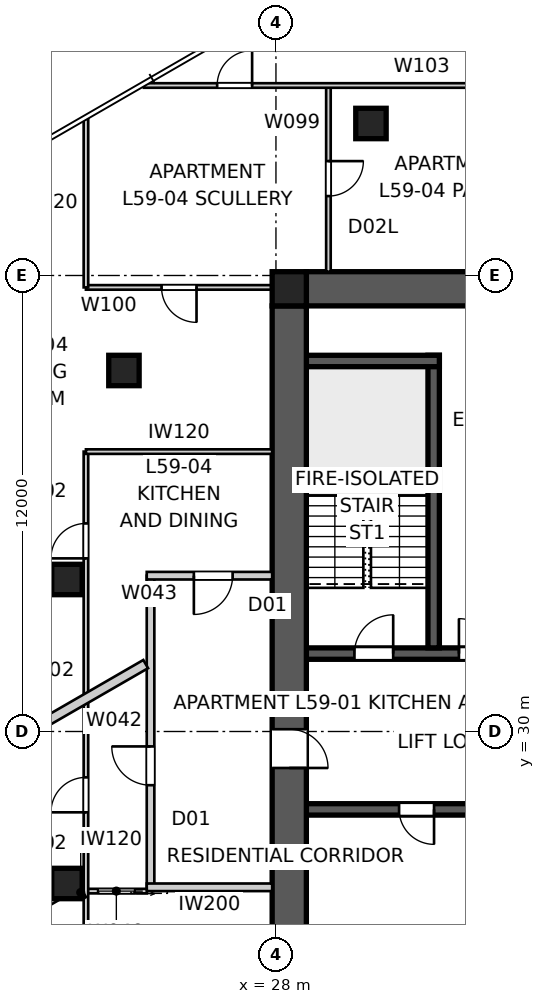
"""IFC4 building model, lengths in metres.
Left out: names, types, materials, properties, quantities, classifications, styles, units other than length and angle.
Written with IfcOpenShell. Run it as: python <this file> out.ifc"""

import sys

from ifc_helpers import new_model, si_unit, direction, frame, frame_2d, origin, origin_2d, place, context, subcontext, project, spatial, polyline, rectangle, outline, extrude, element, fill, save


model = new_model("IFC4")
c1 = context("Model", 3, precision=1e-05, world=origin(), true_north=direction((0.0, 1.0)))
c2 = subcontext(c1, "Body", "Model", "MODEL_VIEW")
j1 = project(units=[si_unit("LENGTHUNIT", "METRE"), si_unit("PLANEANGLEUNIT", "RADIAN")], contexts=[c1])
p1 = place(None, origin())
s1 = spatial("IfcSite", under=j1, at=p1, CompositionType="ELEMENT")
p2 = place(p1, origin())
s2 = spatial("IfcBuilding", under=s1, at=p2, CompositionType="ELEMENT")
p3 = place(p2, frame((0.0, 0.0, 215.0)))
s3 = spatial("IfcBuildingStorey", under=s2, at=p3, CompositionType="ELEMENT", Elevation=215.0)
p4 = place(p3, frame((28.8, 41.65, 0.0), z_axis=(0.0, 0.0, 1.0), x_axis=(1.0, 0.0, 0.0)))
e1 = element("IfcWall", 1, at=p4, inside=s3, PredefinedType="SHEAR", context=c2, shape_type="SweptSolid", body=[
    extrude(outline(polyline([(0.0, -0.45), (22.4, -0.45), (22.4, -0.025), (22.85, -0.025), (22.85, 0.025), (22.4, 0.025), (22.4, 0.45), (0.0, 0.45), (0.0, 0.025), (-0.45, 0.025), (-0.45, -0.025), (0.0, -0.025), (0.0, -0.45)])), origin(), (0.0, 0.0, 1.0), 3.4),
])
p5 = place(p3, frame((28.35, 41.2, 0.0), z_axis=(0.0, 0.0, 1.0), x_axis=(0.0, -1.0, 0.0)))
e2 = element("IfcWall", 2, at=p5, inside=s3, PredefinedType="SHEAR", context=c2, shape_type="SweptSolid", body=[
    extrude(outline(polyline([(0.0, -0.45), (22.4, -0.45), (22.4, -0.025), (22.85, -0.025), (22.85, 0.025), (22.4, 0.025), (22.4, 0.45), (0.0, 0.45), (0.0, 0.025), (-0.45, 0.025), (-0.45, -0.025), (0.0, -0.025), (0.0, -0.45)])), origin(), (0.0, 0.0, 1.0), 3.4),
])
p6 = place(p5, frame((11.14, 0.0, 0.0)))
e3 = element("IfcOpeningElement", 3, at=p6, cuts=e2, PredefinedType="OPENING", context=c2, shape_type="SweptSolid", body=[
    extrude(rectangle(XDim=1.02, YDim=2.4, at=frame_2d((0.51, 1.2))), frame((0.0, 0.46, 0.0), z_axis=(0.0, -1.0, 0.0), x_axis=(1.0, 0.0, 0.0)), (0.0, 0.0, 1.0), 0.92),
])
p7 = place(p3, frame((28.8, 32.05, 0.0), z_axis=(0.0, 0.0, 1.0), x_axis=(1.0, 0.0, 0.0)))
e4 = element("IfcWall", 4, at=p7, inside=s3, PredefinedType="SHEAR", context=c2, shape_type="SweptSolid", body=[
    extrude(rectangle(XDim=22.4, YDim=0.3, at=frame_2d((11.2, 0.0))), origin(), (0.0, 0.0, 1.0), 3.4),
])
p8 = place(p7, frame((19.04, 0.0, 0.0)))
e5 = element("IfcOpeningElement", 5, at=p8, cuts=e4, PredefinedType="OPENING", context=c2, shape_type="SweptSolid", body=[
    extrude(rectangle(XDim=0.92, YDim=2.1, at=frame_2d((0.46, 1.05))), frame((0.0, 0.16, 0.0), z_axis=(0.0, -1.0, 0.0), x_axis=(1.0, 0.0, 0.0)), (0.0, 0.0, 1.0), 0.32),
])
p9 = place(p7, frame((1.265, 0.0, 0.0)))
e6 = element("IfcOpeningElement", 6, at=p9, cuts=e4, PredefinedType="OPENING", context=c2, shape_type="SweptSolid", body=[
    extrude(rectangle(XDim=1.02, YDim=2.1, at=frame_2d((0.51, 1.05))), frame((0.0, 0.16, 0.0), z_axis=(0.0, -1.0, 0.0), x_axis=(1.0, 0.0, 0.0)), (0.0, 0.0, 1.0), 0.32),
])
p10 = place(p7, frame((4.015, 0.0, 0.0)))
e7 = element("IfcOpeningElement", 7, at=p10, cuts=e4, PredefinedType="OPENING", context=c2, shape_type="SweptSolid", body=[
    extrude(rectangle(XDim=0.92, YDim=2.1, at=frame_2d((0.46, 1.05))), frame((0.0, 0.16, 0.0), z_axis=(0.0, -1.0, 0.0), x_axis=(1.0, 0.0, 0.0)), (0.0, 0.0, 1.0), 0.32),
])
p11 = place(p7, frame((7.015, 0.0, 0.0)))
e8 = element("IfcOpeningElement", 8, at=p11, cuts=e4, PredefinedType="OPENING", context=c2, shape_type="SweptSolid", body=[
    extrude(rectangle(XDim=0.92, YDim=2.1, at=frame_2d((0.46, 1.05))), frame((0.0, 0.16, 0.0), z_axis=(0.0, -1.0, 0.0), x_axis=(1.0, 0.0, 0.0)), (0.0, 0.0, 1.0), 0.32),
])
p12 = place(p7, frame((9.34, 0.0, 0.0)))
e9 = element("IfcOpeningElement", 9, at=p12, cuts=e4, PredefinedType="OPENING", context=c2, shape_type="SweptSolid", body=[
    extrude(rectangle(XDim=0.92, YDim=2.1, at=frame_2d((0.46, 1.05))), frame((0.0, 0.16, 0.0), z_axis=(0.0, -1.0, 0.0), x_axis=(1.0, 0.0, 0.0)), (0.0, 0.0, 1.0), 0.32),
])
p13 = place(p7, frame((12.05, 0.0, 0.0)))
e10 = element("IfcOpeningElement", 10, at=p13, cuts=e4, PredefinedType="OPENING", context=c2, shape_type="SweptSolid", body=[
    extrude(rectangle(XDim=1.1, YDim=2.1, at=frame_2d((0.55, 1.05))), frame((0.0, 0.16, 0.0), z_axis=(0.0, -1.0, 0.0), x_axis=(1.0, 0.0, 0.0)), (0.0, 0.0, 1.0), 0.32),
])
p14 = place(p7, frame((14.85, 0.0, 0.0)))
e11 = element("IfcOpeningElement", 11, at=p14, cuts=e4, PredefinedType="OPENING", context=c2, shape_type="SweptSolid", body=[
    extrude(rectangle(XDim=1.1, YDim=2.1, at=frame_2d((0.55, 1.05))), frame((0.0, 0.16, 0.0), z_axis=(0.0, -1.0, 0.0), x_axis=(1.0, 0.0, 0.0)), (0.0, 0.0, 1.0), 0.32),
])
p15 = place(p3, frame((51.2, 27.95, 0.0), z_axis=(0.0, 0.0, 1.0), x_axis=(-1.0, 0.0, 0.0)))
e12 = element("IfcWall", 12, at=p15, inside=s3, PredefinedType="SHEAR", context=c2, shape_type="SweptSolid", body=[
    extrude(rectangle(XDim=22.4, YDim=0.3, at=frame_2d((11.2, 0.0))), origin(), (0.0, 0.0, 1.0), 3.4),
])
p16 = place(p15, frame((19.04, 0.0, 0.0)))
e13 = element("IfcOpeningElement", 13, at=p16, cuts=e12, PredefinedType="OPENING", context=c2, shape_type="SweptSolid", body=[
    extrude(rectangle(XDim=0.92, YDim=2.1, at=frame_2d((0.46, 1.05))), frame((0.0, 0.16, 0.0), z_axis=(0.0, -1.0, 0.0), x_axis=(1.0, 0.0, 0.0)), (0.0, 0.0, 1.0), 0.32),
])
p17 = place(p15, frame((1.265, 0.0, 0.0)))
e14 = element("IfcOpeningElement", 14, at=p17, cuts=e12, PredefinedType="OPENING", context=c2, shape_type="SweptSolid", body=[
    extrude(rectangle(XDim=1.02, YDim=2.1, at=frame_2d((0.51, 1.05))), frame((0.0, 0.16, 0.0), z_axis=(0.0, -1.0, 0.0), x_axis=(1.0, 0.0, 0.0)), (0.0, 0.0, 1.0), 0.32),
])
p18 = place(p15, frame((4.015, 0.0, 0.0)))
e15 = element("IfcOpeningElement", 15, at=p18, cuts=e12, PredefinedType="OPENING", context=c2, shape_type="SweptSolid", body=[
    extrude(rectangle(XDim=0.92, YDim=2.1, at=frame_2d((0.46, 1.05))), frame((0.0, 0.16, 0.0), z_axis=(0.0, -1.0, 0.0), x_axis=(1.0, 0.0, 0.0)), (0.0, 0.0, 1.0), 0.32),
])
p19 = place(p15, frame((9.79, 0.0, 0.0)))
e16 = element("IfcOpeningElement", 16, at=p19, cuts=e12, PredefinedType="OPENING", context=c2, shape_type="SweptSolid", body=[
    extrude(rectangle(XDim=0.92, YDim=2.1, at=frame_2d((0.46, 1.05))), frame((0.0, 0.16, 0.0), z_axis=(0.0, -1.0, 0.0), x_axis=(1.0, 0.0, 0.0)), (0.0, 0.0, 1.0), 0.32),
])
p20 = place(p15, frame((6.115, 0.0, 0.0)))
e17 = element("IfcOpeningElement", 17, at=p20, cuts=e12, PredefinedType="OPENING", context=c2, shape_type="SweptSolid", body=[
    extrude(rectangle(XDim=0.92, YDim=2.1, at=frame_2d((0.46, 1.05))), frame((0.0, 0.16, 0.0), z_axis=(0.0, -1.0, 0.0), x_axis=(1.0, 0.0, 0.0)), (0.0, 0.0, 1.0), 0.32),
])
p21 = place(p15, frame((12.05, 0.0, 0.0)))
e18 = element("IfcOpeningElement", 18, at=p21, cuts=e12, PredefinedType="OPENING", context=c2, shape_type="SweptSolid", body=[
    extrude(rectangle(XDim=1.1, YDim=2.1, at=frame_2d((0.55, 1.05))), frame((0.0, 0.16, 0.0), z_axis=(0.0, -1.0, 0.0), x_axis=(1.0, 0.0, 0.0)), (0.0, 0.0, 1.0), 0.32),
])
p22 = place(p15, frame((14.85, 0.0, 0.0)))
e19 = element("IfcOpeningElement", 19, at=p22, cuts=e12, PredefinedType="OPENING", context=c2, shape_type="SweptSolid", body=[
    extrude(rectangle(XDim=1.1, YDim=2.1, at=frame_2d((0.55, 1.05))), frame((0.0, 0.16, 0.0), z_axis=(0.0, -1.0, 0.0), x_axis=(1.0, 0.0, 0.0)), (0.0, 0.0, 1.0), 0.32),
])
p23 = place(p3, frame((32.15, 32.2, 0.0), z_axis=(0.0, 0.0, 1.0), x_axis=(0.0, 1.0, 0.0)))
e20 = element("IfcWall", 20, at=p23, inside=s3, PredefinedType="SHEAR", context=c2, shape_type="SweptSolid", body=[
    extrude(rectangle(XDim=7.7, YDim=0.3, at=frame_2d((3.85, 0.0))), origin(), (0.0, 0.0, 1.0), 3.4),
])
p24 = place(p3, frame((28.8, 39.75, 0.0), z_axis=(0.0, 0.0, 1.0), x_axis=(1.0, 0.0, 0.0)))
e21 = element("IfcWall", 21, at=p24, inside=s3, PredefinedType="SHEAR", context=c2, shape_type="SweptSolid", body=[
    extrude(rectangle(XDim=3.5, YDim=0.3, at=frame_2d((1.75, 0.0))), origin(), (0.0, 0.0, 1.0), 3.4),
])
p25 = place(p3, frame((28.35, 41.65, 0.0), z_axis=(0.0, 0.0, 1.0), x_axis=(1.0, 0.0, 0.0)))
e22 = element("IfcColumn", 22, at=p25, inside=s3, PredefinedType="COLUMN", context=c2, shape_type="SweptSolid", body=[
    extrude(rectangle(XDim=0.9, YDim=0.9, at=origin_2d()), origin(), (0.0, 0.0, 1.0), 3.4),
])
for number, where, z_axis, x_axis in (
    (23, (30.5, 46.0, 0.0), (0.0, 0.0, 1.0), (1.0, 0.0, 0.0)),
    (24, (24.0, 39.5, 0.0), (0.0, 0.0, 1.0), (1.0, 0.0, 0.0)),
    (25, (22.5, 34.0, 0.0), (0.0, 0.0, 1.0), (1.0, 0.0, 0.0)),
    (26, (22.5, 26.0, 0.0), (0.0, 0.0, 1.0), (1.0, 0.0, 0.0)),
):
    element("IfcColumn", number, at=place(p3, frame(where, z_axis=z_axis, x_axis=x_axis)), inside=s3, PredefinedType="COLUMN", context=c2, shape_type="SweptSolid", body=[
        extrude(rectangle(XDim=0.8, YDim=0.8, at=origin_2d()), origin(), (0.0, 0.0, 1.0), 3.4),
    ])
p26 = place(p3, frame((24.7, 25.9, 0.0), z_axis=(0.0, 0.0, 1.0), x_axis=(0.0, 1.0, 0.0)))
e27 = element("IfcWall", 27, at=p26, inside=s3, PredefinedType="PARTITIONING", context=c2, shape_type="SweptSolid", body=[
    extrude(rectangle(XDim=8.2, YDim=0.2, at=frame_2d((4.1, 0.0))), origin(), (0.0, 0.0, 1.0), 3.25),
])
p27 = place(p26, frame((2.687, 0.0, 0.0)))
e28 = element("IfcOpeningElement", 28, at=p27, cuts=e27, PredefinedType="OPENING", context=c2, shape_type="SweptSolid", body=[
    extrude(rectangle(XDim=1.02, YDim=2.34, at=frame_2d((0.51, 1.17))), frame((0.0, 0.11, 0.0), z_axis=(0.0, -1.0, 0.0), x_axis=(1.0, 0.0, 0.0)), (0.0, 0.0, 1.0), 0.22),
])
p28 = place(p3, frame((27.9, 34.1, 0.0), z_axis=(0.0, 0.0, 1.0), x_axis=(-1.0, 0.0, 0.0)))
e29 = element("IfcWall", 29, at=p28, inside=s3, PredefinedType="PARTITIONING", context=c2, shape_type="SweptSolid", body=[
    extrude(rectangle(XDim=3.3, YDim=0.2, at=frame_2d((1.65, 0.0))), origin(), (0.0, 0.0, 1.0), 3.25),
])
p29 = place(p28, frame((1.04, 0.0, 0.0)))
e30 = element("IfcOpeningElement", 30, at=p29, cuts=e29, PredefinedType="OPENING", context=c2, shape_type="SweptSolid", body=[
    extrude(rectangle(XDim=1.02, YDim=2.34, at=frame_2d((0.51, 1.17))), frame((0.0, 0.11, 0.0), z_axis=(0.0, -1.0, 0.0), x_axis=(1.0, 0.0, 0.0)), (0.0, 0.0, 1.0), 0.22),
])
p30 = place(p3, frame((27.9, 25.9, 0.0), z_axis=(0.0, 0.0, 1.0), x_axis=(-1.0, 0.0, 0.0)))
e31 = element("IfcWall", 31, at=p30, inside=s3, PredefinedType="PARTITIONING", context=c2, shape_type="SweptSolid", body=[
    extrude(rectangle(XDim=3.3, YDim=0.2, at=frame_2d((1.65, 0.0))), origin(), (0.0, 0.0, 1.0), 3.25),
])
p31 = place(p3, frame((15.889, 26.761, 0.0), z_axis=(0.0, 0.0, 1.0), x_axis=(0.866024190901, 0.50000210077, 0.0)))
e32 = element("IfcWall", 32, at=p31, inside=s3, PredefinedType="PARTITIONING", context=c2, shape_type="SweptSolid", body=[
    extrude(rectangle(XDim=10.026, YDim=0.25, at=frame_2d((5.013, 0.0))), origin(), (0.0, 0.0, 1.0), 3.25),
])
p32 = place(p3, frame((24.6, 25.8, 0.0), z_axis=(0.0, 0.0, 1.0), x_axis=(-1.0, 0.0, 0.0)))
e33 = element("IfcWall", 33, at=p32, inside=s3, PredefinedType="PARTITIONING", context=c2, shape_type="SweptSolid", body=[
    extrude(rectangle(XDim=1.6, YDim=0.12, at=frame_2d((0.8, 0.0))), origin(), (0.0, 0.0, 1.0), 3.25),
])
p33 = place(p32, frame((0.32, 0.0, 0.0)))
e34 = element("IfcOpeningElement", 34, at=p33, cuts=e33, PredefinedType="OPENING", context=c2, shape_type="SweptSolid", body=[
    extrude(rectangle(XDim=0.96, YDim=2.1, at=frame_2d((0.48, 1.05))), frame((0.0, 0.07, 0.0), z_axis=(0.0, -1.0, 0.0), x_axis=(1.0, 0.0, 0.0)), (0.0, 0.0, 1.0), 0.14),
])
p34 = place(p3, frame((23.0, 20.185, 0.0), z_axis=(0.0, 0.0, 1.0), x_axis=(0.0, 1.0, 0.0)))
e35 = element("IfcWall", 35, at=p34, inside=s3, PredefinedType="PARTITIONING", context=c2, shape_type="SweptSolid", body=[
    extrude(rectangle(XDim=17.18, YDim=0.12, at=frame_2d((8.59, 0.0))), origin(), (0.0, 0.0, 1.0), 2.55),
])
p35 = place(p34, frame((7.688, 0.0, 0.0)))
e36 = element("IfcOpeningElement", 36, at=p35, cuts=e35, PredefinedType="OPENING", context=c2, shape_type="SweptSolid", body=[
    extrude(rectangle(XDim=0.92, YDim=2.34, at=frame_2d((0.46, 1.17))), frame((0.0, 0.07, 0.0), z_axis=(0.0, -1.0, 0.0), x_axis=(1.0, 0.0, 0.0)), (0.0, 0.0, 1.0), 0.14),
])
p36 = place(p34, frame((14.371, 0.0, 0.0)))
e37 = element("IfcOpeningElement", 37, at=p36, cuts=e35, PredefinedType="OPENING", context=c2, shape_type="SweptSolid", body=[
    extrude(rectangle(XDim=0.92, YDim=2.34, at=frame_2d((0.46, 1.17))), frame((0.0, 0.07, 0.0), z_axis=(0.0, -1.0, 0.0), x_axis=(1.0, 0.0, 0.0)), (0.0, 0.0, 1.0), 0.14),
])
p37 = place(p3, frame((22.95, 25.612, 0.0), z_axis=(0.0, 0.0, 1.0), x_axis=(-0.49996389635, 0.866046247233, 0.0)))
e38 = element("IfcWall", 38, at=p37, inside=s3, PredefinedType="PARTITIONING", context=c2, shape_type="SweptSolid", body=[
    extrude(rectangle(XDim=0.35, YDim=0.12, at=frame_2d((0.175, 0.0))), origin(), (0.0, 0.0, 1.0), 3.25),
])
p38 = place(p3, frame((22.775, 25.915, 0.0), z_axis=(0.0, 0.0, 1.0), x_axis=(-0.866019274569, -0.500010615962, 0.0)))
e39 = element("IfcWall", 39, at=p38, inside=s3, PredefinedType="PARTITIONING", context=c2, shape_type="SweptSolid", body=[
    extrude(rectangle(XDim=5.5, YDim=0.12, at=frame_2d((2.75, 0.0))), origin(), (0.0, 0.0, 1.0), 3.25),
])
p39 = place(p38, frame((2.31, 0.0, 0.0)))
e40 = element("IfcOpeningElement", 40, at=p39, cuts=e39, PredefinedType="OPENING", context=c2, shape_type="SweptSolid", body=[
    extrude(rectangle(XDim=0.92, YDim=2.34, at=frame_2d((0.46, 1.17))), frame((0.0, 0.07, 0.0), z_axis=(0.0, -1.0, 0.0), x_axis=(1.0, 0.0, 0.0)), (0.0, 0.0, 1.0), 0.14),
])
p40 = place(p3, frame((23.0, 37.365, 0.0), z_axis=(0.0, 0.0, 1.0), x_axis=(1.0, 0.0, 0.0)))
e41 = element("IfcWall", 41, at=p40, inside=s3, PredefinedType="PARTITIONING", context=c2, shape_type="SweptSolid", body=[
    extrude(rectangle(XDim=4.9, YDim=0.12, at=frame_2d((2.45, 0.0))), origin(), (0.0, 0.0, 1.0), 3.25),
])
p41 = place(p3, frame((29.381, 47.0, 0.0), z_axis=(0.0, 0.0, 1.0), x_axis=(0.0, -1.0, 0.0)))
e42 = element("IfcWall", 42, at=p41, inside=s3, PredefinedType="PARTITIONING", context=c2, shape_type="SweptSolid", body=[
    extrude(rectangle(XDim=4.9, YDim=0.12, at=frame_2d((2.45, 0.0))), origin(), (0.0, 0.0, 1.0), 3.25),
])
p42 = place(p41, frame((1.99, 0.0, 0.0)))
e43 = element("IfcOpeningElement", 43, at=p42, cuts=e42, PredefinedType="OPENING", context=c2, shape_type="SweptSolid", body=[
    extrude(rectangle(XDim=0.92, YDim=2.1, at=frame_2d((0.46, 1.05))), frame((0.0, 0.07, 0.0), z_axis=(0.0, -1.0, 0.0), x_axis=(1.0, 0.0, 0.0)), (0.0, 0.0, 1.0), 0.14),
])
p43 = place(p3, frame((27.9, 41.687, 0.0), z_axis=(0.0, 0.0, 1.0), x_axis=(-1.0, 0.0, 0.0)))
e44 = element("IfcWall", 44, at=p43, inside=s3, PredefinedType="PARTITIONING", context=c2, shape_type="SweptSolid", body=[
    extrude(rectangle(XDim=4.9, YDim=0.12, at=frame_2d((2.45, 0.0))), origin(), (0.0, 0.0, 1.0), 3.25),
])
p44 = place(p43, frame((1.99, 0.0, 0.0)))
e45 = element("IfcOpeningElement", 45, at=p44, cuts=e44, PredefinedType="OPENING", context=c2, shape_type="SweptSolid", body=[
    extrude(rectangle(XDim=0.92, YDim=2.1, at=frame_2d((0.46, 1.05))), frame((0.0, 0.07, 0.0), z_axis=(0.0, -1.0, 0.0), x_axis=(1.0, 0.0, 0.0)), (0.0, 0.0, 1.0), 0.14),
])
p45 = place(p3, frame((23.0, 41.687, 0.0), z_axis=(0.0, 0.0, 1.0), x_axis=(0.0, 1.0, 0.0)))
e46 = element("IfcWall", 46, at=p45, inside=s3, PredefinedType="PARTITIONING", context=c2, shape_type="SweptSolid", body=[
    extrude(rectangle(XDim=4.433, YDim=0.12, at=frame_2d((2.216, 0.0))), origin(), (0.0, 0.0, 1.0), 3.25),
])
p46 = place(p3, frame((24.525, 47.0, 0.0), z_axis=(0.0, 0.0, 1.0), x_axis=(1.0, 0.0, 0.0)))
e47 = element("IfcWall", 47, at=p46, inside=s3, PredefinedType="PARTITIONING", context=c2, shape_type="SweptSolid", body=[
    extrude(rectangle(XDim=22.087, YDim=0.12, at=frame_2d((11.044, 0.0))), origin(), (0.0, 0.0, 1.0), 2.55),
])
p47 = place(p46, frame((1.928, 0.0, 0.0)))
e48 = element("IfcOpeningElement", 48, at=p47, cuts=e47, PredefinedType="OPENING", context=c2, shape_type="SweptSolid", body=[
    extrude(rectangle(XDim=0.92, YDim=2.34, at=frame_2d((0.46, 1.17))), frame((0.0, 0.07, 0.0), z_axis=(0.0, -1.0, 0.0), x_axis=(1.0, 0.0, 0.0)), (0.0, 0.0, 1.0), 0.14),
])
p48 = place(p46, frame((17.73, 0.0, 0.0)))
e49 = element("IfcOpeningElement", 49, at=p48, cuts=e47, PredefinedType="OPENING", context=c2, shape_type="SweptSolid", body=[
    extrude(rectangle(XDim=0.96, YDim=2.1, at=frame_2d((0.48, 1.05))), frame((0.0, 0.07, 0.0), z_axis=(0.0, -1.0, 0.0), x_axis=(1.0, 0.0, 0.0)), (0.0, 0.0, 1.0), 0.14),
])
p49 = place(p3, frame((35.526, 47.0, 0.0), z_axis=(0.0, 0.0, 1.0), x_axis=(-0.500010615962, 0.866019274569, 0.0)))
e50 = element("IfcWall", 50, at=p49, inside=s3, PredefinedType="PARTITIONING", context=c2, shape_type="SweptSolid", body=[
    extrude(rectangle(XDim=5.5, YDim=0.12, at=frame_2d((2.75, 0.0))), origin(), (0.0, 0.0, 1.0), 3.25),
])
p50 = place(p49, frame((2.31, 0.0, 0.0)))
e51 = element("IfcOpeningElement", 51, at=p50, cuts=e50, PredefinedType="OPENING", context=c2, shape_type="SweptSolid", body=[
    extrude(rectangle(XDim=0.92, YDim=2.34, at=frame_2d((0.46, 1.17))), frame((0.0, 0.07, 0.0), z_axis=(0.0, -1.0, 0.0), x_axis=(1.0, 0.0, 0.0)), (0.0, 0.0, 1.0), 0.14),
])
p51 = place(p3, frame((27.9, 41.687, 0.0), z_axis=(0.0, 0.0, 1.0), x_axis=(0.999162409553, -0.040920402453, 0.0)))
e52 = element("IfcWall", 52, at=p51, inside=s3, PredefinedType="PARTITIONING", context=c2, shape_type="SweptSolid", body=[
    extrude(rectangle(XDim=0.901, YDim=0.12, at=frame_2d((0.45, 0.0))), origin(), (0.0, 0.0, 1.0), 3.25),
])
p52 = place(p16, origin())
e53 = element("IfcDoor", 53, at=p52, inside=s3, OperationType="SINGLE_SWING_LEFT", PredefinedType="DOOR", context=c2, shape_type="SweptSolid", body=[
    extrude(rectangle(XDim=0.92, YDim=2.1, at=frame_2d((0.46, 1.05))), frame((0.0, 0.025, 0.0), z_axis=(0.0, -1.0, 0.0), x_axis=(1.0, 0.0, 0.0)), (0.0, 0.0, 1.0), 0.05),
])
fill(e13, e53)
p53 = place(p9, origin())
e54 = element("IfcDoor", 54, at=p53, inside=s3, OperationType="SINGLE_SWING_RIGHT", PredefinedType="DOOR", context=c2, shape_type="SweptSolid", body=[
    extrude(rectangle(XDim=1.02, YDim=2.1, at=frame_2d((0.51, 1.05))), frame((0.0, 0.025, 0.0), z_axis=(0.0, -1.0, 0.0), x_axis=(1.0, 0.0, 0.0)), (0.0, 0.0, 1.0), 0.05),
])
fill(e6, e54)
p54 = place(p10, origin())
e55 = element("IfcDoor", 55, at=p54, inside=s3, OperationType="SINGLE_SWING_LEFT", PredefinedType="DOOR", context=c2, shape_type="SweptSolid", body=[
    extrude(rectangle(XDim=0.92, YDim=2.1, at=frame_2d((0.46, 1.05))), frame((0.0, 0.025, 0.0), z_axis=(0.0, -1.0, 0.0), x_axis=(1.0, 0.0, 0.0)), (0.0, 0.0, 1.0), 0.05),
])
fill(e7, e55)
p55 = place(p27, origin())
e56 = element("IfcDoor", 56, at=p55, inside=s3, OperationType="SINGLE_SWING_RIGHT", PredefinedType="DOOR", context=c2, shape_type="SweptSolid", body=[
    extrude(rectangle(XDim=1.02, YDim=2.34, at=frame_2d((0.51, 1.17))), frame((0.0, 0.025, 0.0), z_axis=(0.0, -1.0, 0.0), x_axis=(1.0, 0.0, 0.0)), (0.0, 0.0, 1.0), 0.05),
])
fill(e28, e56)
p56 = place(p29, origin())
e57 = element("IfcDoor", 57, at=p56, inside=s3, OperationType="SINGLE_SWING_RIGHT", PredefinedType="DOOR", context=c2, shape_type="SweptSolid", body=[
    extrude(rectangle(XDim=1.02, YDim=2.34, at=frame_2d((0.51, 1.17))), frame((0.0, 0.025, 0.0), z_axis=(0.0, -1.0, 0.0), x_axis=(1.0, 0.0, 0.0)), (0.0, 0.0, 1.0), 0.05),
])
fill(e30, e57)
p57 = place(p35, origin())
e58 = element("IfcDoor", 58, at=p57, inside=s3, OperationType="SINGLE_SWING_LEFT", PredefinedType="DOOR", context=c2, shape_type="SweptSolid", body=[
    extrude(rectangle(XDim=0.92, YDim=2.34, at=frame_2d((0.46, 1.17))), frame((0.0, 0.025, 0.0), z_axis=(0.0, -1.0, 0.0), x_axis=(1.0, 0.0, 0.0)), (0.0, 0.0, 1.0), 0.05),
])
fill(e36, e58)
p58 = place(p33, origin())
e59 = element("IfcDoor", 59, at=p58, inside=s3, OperationType="SLIDING_TO_LEFT", PredefinedType="DOOR", context=c2, shape_type="SweptSolid", body=[
    extrude(rectangle(XDim=0.96, YDim=2.1, at=frame_2d((0.48, 1.05))), frame((0.0, 0.025, 0.0), z_axis=(0.0, -1.0, 0.0), x_axis=(1.0, 0.0, 0.0)), (0.0, 0.0, 1.0), 0.05),
])
fill(e34, e59)
p59 = place(p36, origin())
e60 = element("IfcDoor", 60, at=p59, inside=s3, OperationType="SINGLE_SWING_LEFT", PredefinedType="DOOR", context=c2, shape_type="SweptSolid", body=[
    extrude(rectangle(XDim=0.92, YDim=2.34, at=frame_2d((0.46, 1.17))), frame((0.0, 0.025, 0.0), z_axis=(0.0, -1.0, 0.0), x_axis=(1.0, 0.0, 0.0)), (0.0, 0.0, 1.0), 0.05),
])
fill(e37, e60)
p60 = place(p44, origin())
e61 = element("IfcDoor", 61, at=p60, inside=s3, OperationType="SINGLE_SWING_LEFT", PredefinedType="DOOR", context=c2, shape_type="SweptSolid", body=[
    extrude(rectangle(XDim=0.92, YDim=2.1, at=frame_2d((0.46, 1.05))), frame((0.0, 0.025, 0.0), z_axis=(0.0, -1.0, 0.0), x_axis=(1.0, 0.0, 0.0)), (0.0, 0.0, 1.0), 0.05),
])
fill(e45, e61)
p61 = place(p47, origin())
e62 = element("IfcDoor", 62, at=p61, inside=s3, OperationType="SINGLE_SWING_RIGHT", PredefinedType="DOOR", context=c2, shape_type="SweptSolid", body=[
    extrude(rectangle(XDim=0.92, YDim=2.34, at=frame_2d((0.46, 1.17))), frame((0.0, 0.025, 0.0), z_axis=(0.0, -1.0, 0.0), x_axis=(1.0, 0.0, 0.0)), (0.0, 0.0, 1.0), 0.05),
])
fill(e48, e62)
p62 = place(p42, origin())
e63 = element("IfcDoor", 63, at=p62, inside=s3, OperationType="SINGLE_SWING_LEFT", PredefinedType="DOOR", context=c2, shape_type="SweptSolid", body=[
    extrude(rectangle(XDim=0.92, YDim=2.1, at=frame_2d((0.46, 1.05))), frame((0.0, 0.025, 0.0), z_axis=(0.0, -1.0, 0.0), x_axis=(1.0, 0.0, 0.0)), (0.0, 0.0, 1.0), 0.05),
])
fill(e43, e63)
p63 = place(p6, origin())
e64 = element("IfcDoor", 64, at=p63, inside=s3, OperationType="SINGLE_SWING_RIGHT", PredefinedType="DOOR", context=c2, shape_type="SweptSolid", body=[
    extrude(rectangle(XDim=1.02, YDim=2.4, at=frame_2d((0.51, 1.2))), frame((0.0, 0.025, 0.0), z_axis=(0.0, -1.0, 0.0), x_axis=(1.0, 0.0, 0.0)), (0.0, 0.0, 1.0), 0.05),
])
fill(e3, e64)
save(model, sys.argv[1])
